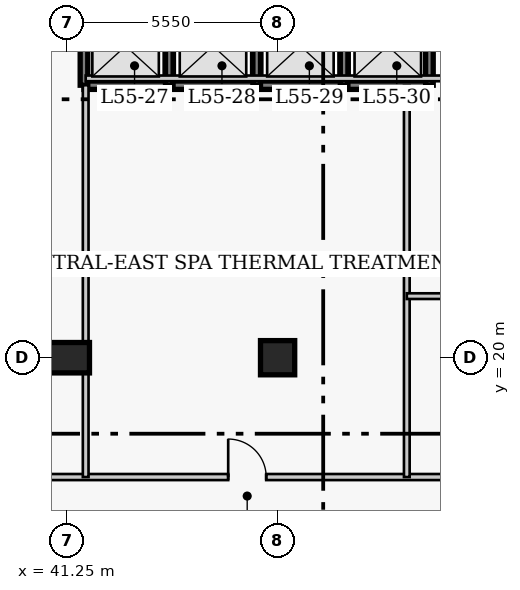
"""IFC4 building model, lengths in metres.
Left out: names, types, materials, properties, quantities, classifications, styles, units other than length and angle.
Written with IfcOpenShell. Run it as: python <this file> out.ifc"""

import sys

from ifc_helpers import new_model, si_unit, direction, frame, frame_2d, origin, origin_2d, place, context, subcontext, project, spatial, rectangle, extrude, element, fill, save


model = new_model("IFC4")
c1 = context("Model", 3, precision=1e-05, world=origin(), true_north=direction((0.0, 1.0)))
c2 = subcontext(c1, "Body", "Model", "MODEL_VIEW")
j1 = project(units=[si_unit("LENGTHUNIT", "METRE"), si_unit("PLANEANGLEUNIT", "RADIAN")], contexts=[c1])
p1 = place(None, origin())
s1 = spatial("IfcSite", under=j1, at=p1, CompositionType="ELEMENT")
p2 = place(p1, origin())
s2 = spatial("IfcBuilding", under=s1, at=p2, CompositionType="ELEMENT")
p3 = place(p2, frame((0.0, 0.0, 220.2)))
s3 = spatial("IfcBuildingStorey", under=s2, at=p3, CompositionType="ELEMENT", Elevation=220.2)
p4 = place(p3, frame((41.25, 20.0, 0.0), z_axis=(0.0, 0.0, 1.0), x_axis=(1.0, 0.0, 0.0)))
e1 = element("IfcColumn", 1, at=p4, inside=s3, PredefinedType="COLUMN", context=c2, shape_type="SweptSolid", body=[
    extrude(rectangle(XDim=1.2, YDim=0.8, at=origin_2d()), origin(), (0.0, 0.0, 1.0), 3.9),
])
p5 = place(p3, frame((46.8, 20.0, 0.0), z_axis=(0.0, 0.0, 1.0), x_axis=(1.0, 0.0, 0.0)))
e2 = element("IfcColumn", 2, at=p5, inside=s3, PredefinedType="COLUMN", context=c2, shape_type="SweptSolid", body=[
    extrude(rectangle(XDim=0.9, YDim=0.9, at=origin_2d()), origin(), (0.0, 0.0, 1.0), 3.9),
])
p6 = place(p3, frame((41.705, 27.17, 0.0), z_axis=(0.0, 0.0, 1.0), x_axis=(1.0, 0.0, 0.0)))
e3 = element("IfcWall", 3, at=p6, inside=s3, PredefinedType="SHEAR", context=c2, shape_type="SweptSolid", body=[
    extrude(rectangle(XDim=2.245, YDim=0.22, at=frame_2d((1.123, 0.0))), origin(), (0.0, 0.0, 1.0), 3.9),
])
p7 = place(p3, frame((41.705, 27.17, 0.0), z_axis=(0.0, 0.0, 1.0), x_axis=(0.0, 1.0, 0.0)))
e4 = element("IfcWall", 4, at=p7, inside=s3, PredefinedType="SHEAR", context=c2, shape_type="SweptSolid", body=[
    extrude(rectangle(XDim=2.06, YDim=0.2, at=frame_2d((1.03, 0.0))), origin(), (0.0, 0.0, 1.0), 3.9),
])
p8 = place(p3, frame((43.95, 27.17, 0.0), z_axis=(0.0, 0.0, 1.0), x_axis=(1.0, 0.0, 0.0)))
e5 = element("IfcWall", 5, at=p8, inside=s3, PredefinedType="SHEAR", context=c2, shape_type="SweptSolid", body=[
    extrude(rectangle(XDim=2.3, YDim=0.22, at=frame_2d((1.15, 0.0))), origin(), (0.0, 0.0, 1.0), 3.9),
])
p9 = place(p3, frame((43.95, 27.17, 0.0), z_axis=(0.0, 0.0, 1.0), x_axis=(0.0, 1.0, 0.0)))
e6 = element("IfcWall", 6, at=p9, inside=s3, PredefinedType="SHEAR", context=c2, shape_type="SweptSolid", body=[
    extrude(rectangle(XDim=2.06, YDim=0.2, at=frame_2d((1.03, 0.0))), origin(), (0.0, 0.0, 1.0), 3.9),
])
p10 = place(p3, frame((46.25, 27.17, 0.0), z_axis=(0.0, 0.0, 1.0), x_axis=(1.0, 0.0, 0.0)))
e7 = element("IfcWall", 7, at=p10, inside=s3, PredefinedType="SHEAR", context=c2, shape_type="SweptSolid", body=[
    extrude(rectangle(XDim=2.3, YDim=0.22, at=frame_2d((1.15, 0.0))), origin(), (0.0, 0.0, 1.0), 3.9),
])
p11 = place(p3, frame((46.25, 27.17, 0.0), z_axis=(0.0, 0.0, 1.0), x_axis=(0.0, 1.0, 0.0)))
e8 = element("IfcWall", 8, at=p11, inside=s3, PredefinedType="SHEAR", context=c2, shape_type="SweptSolid", body=[
    extrude(rectangle(XDim=2.06, YDim=0.2, at=frame_2d((1.03, 0.0))), origin(), (0.0, 0.0, 1.0), 3.9),
])
p12 = place(p3, frame((48.55, 27.17, 0.0), z_axis=(0.0, 0.0, 1.0), x_axis=(1.0, 0.0, 0.0)))
e9 = element("IfcWall", 9, at=p12, inside=s3, PredefinedType="SHEAR", context=c2, shape_type="SweptSolid", body=[
    extrude(rectangle(XDim=2.245, YDim=0.22, at=frame_2d((1.123, 0.0))), origin(), (0.0, 0.0, 1.0), 3.9),
])
for number, where, z_axis, x_axis in (
    (10, (48.55, 27.17, 0.0), (0.0, 0.0, 1.0), (0.0, 1.0, 0.0)),
    (11, (50.795, 27.17, 0.0), (0.0, 0.0, 1.0), (0.0, 1.0, 0.0)),
):
    element("IfcWall", number, at=place(p3, frame(where, z_axis=z_axis, x_axis=x_axis)), inside=s3, PredefinedType="SHEAR", context=c2, shape_type="SweptSolid", body=[
        extrude(rectangle(XDim=2.06, YDim=0.2, at=frame_2d((1.03, 0.0))), origin(), (0.0, 0.0, 1.0), 3.9),
    ])
p13 = place(p3, frame((35.85, 16.86, 0.0), z_axis=(0.0, 0.0, 1.0), x_axis=(1.0, 0.0, 0.0)))
e12 = element("IfcWall", 12, at=p13, inside=s3, PredefinedType="PARTITIONING", context=c2, shape_type="SweptSolid", body=[
    extrude(rectangle(XDim=22.8, YDim=0.16, at=frame_2d((11.4, 0.0))), origin(), (0.0, 0.0, 1.0), 3.65),
])
p14 = place(p13, frame((9.65, 0.0, 0.0)))
e13 = element("IfcOpeningElement", 13, at=p14, cuts=e12, PredefinedType="OPENING", context=c2, shape_type="SweptSolid", body=[
    extrude(rectangle(XDim=1.0, YDim=2.15, at=frame_2d((0.5, 1.075))), frame((0.0, 0.09, 0.0), z_axis=(0.0, -1.0, 0.0), x_axis=(1.0, 0.0, 0.0)), (0.0, 0.0, 1.0), 0.18),
])
p15 = place(p13, frame((18.05, 0.0, 0.0)))
e14 = element("IfcOpeningElement", 14, at=p15, cuts=e12, PredefinedType="OPENING", context=c2, shape_type="SweptSolid", body=[
    extrude(rectangle(XDim=1.0, YDim=2.15, at=frame_2d((0.5, 1.075))), frame((0.0, 0.09, 0.0), z_axis=(0.0, -1.0, 0.0), x_axis=(1.0, 0.0, 0.0)), (0.0, 0.0, 1.0), 0.18),
])
p16 = place(p3, frame((41.75, 16.86, 0.0), z_axis=(0.0, 0.0, 1.0), x_axis=(0.0, 1.0, 0.0)))
e15 = element("IfcWall", 15, at=p16, inside=s3, PredefinedType="PARTITIONING", context=c2, shape_type="SweptSolid", body=[
    extrude(rectangle(XDim=10.31, YDim=0.15, at=frame_2d((5.155, 0.0))), origin(), (0.0, 0.0, 1.0), 3.65),
])
p17 = place(p3, frame((50.2, 16.86, 0.0), z_axis=(0.0, 0.0, 1.0), x_axis=(0.0, 1.0, 0.0)))
e16 = element("IfcWall", 16, at=p17, inside=s3, PredefinedType="PARTITIONING", context=c2, shape_type="SweptSolid", body=[
    extrude(rectangle(XDim=10.29, YDim=0.15, at=frame_2d((5.145, 0.0))), origin(), (0.0, 0.0, 1.0), 3.65),
])
p18 = place(p3, frame((41.75, 27.35, 0.0), z_axis=(0.0, 0.0, 1.0), x_axis=(1.0, 0.0, 0.0)))
e17 = element("IfcWall", 17, at=p18, inside=s3, PredefinedType="PARTITIONING", context=c2, shape_type="SweptSolid", body=[
    extrude(rectangle(XDim=16.84, YDim=0.15, at=frame_2d((8.42, 0.0))), origin(), (0.0, 0.0, 1.0), 3.65),
])
p19 = place(p3, frame((50.2, 21.62, 0.0), z_axis=(0.0, 0.0, 1.0), x_axis=(1.0, 0.0, 0.0)))
e18 = element("IfcWall", 18, at=p19, inside=s3, PredefinedType="PARTITIONING", context=c2, shape_type="SweptSolid", body=[
    extrude(rectangle(XDim=8.39, YDim=0.15, at=frame_2d((4.195, 0.0))), origin(), (0.0, 0.0, 1.0), 3.65),
])
p20 = place(p14, origin())
e19 = element("IfcDoor", 19, at=p20, inside=s3, OperationType="SINGLE_SWING_LEFT", PredefinedType="DOOR", context=c2, shape_type="SweptSolid", body=[
    extrude(rectangle(XDim=1.0, YDim=2.15, at=frame_2d((0.5, 1.075))), frame((0.0, 0.025, 0.0), z_axis=(0.0, -1.0, 0.0), x_axis=(1.0, 0.0, 0.0)), (0.0, 0.0, 1.0), 0.05),
])
fill(e13, e19)
save(model, sys.argv[1])
